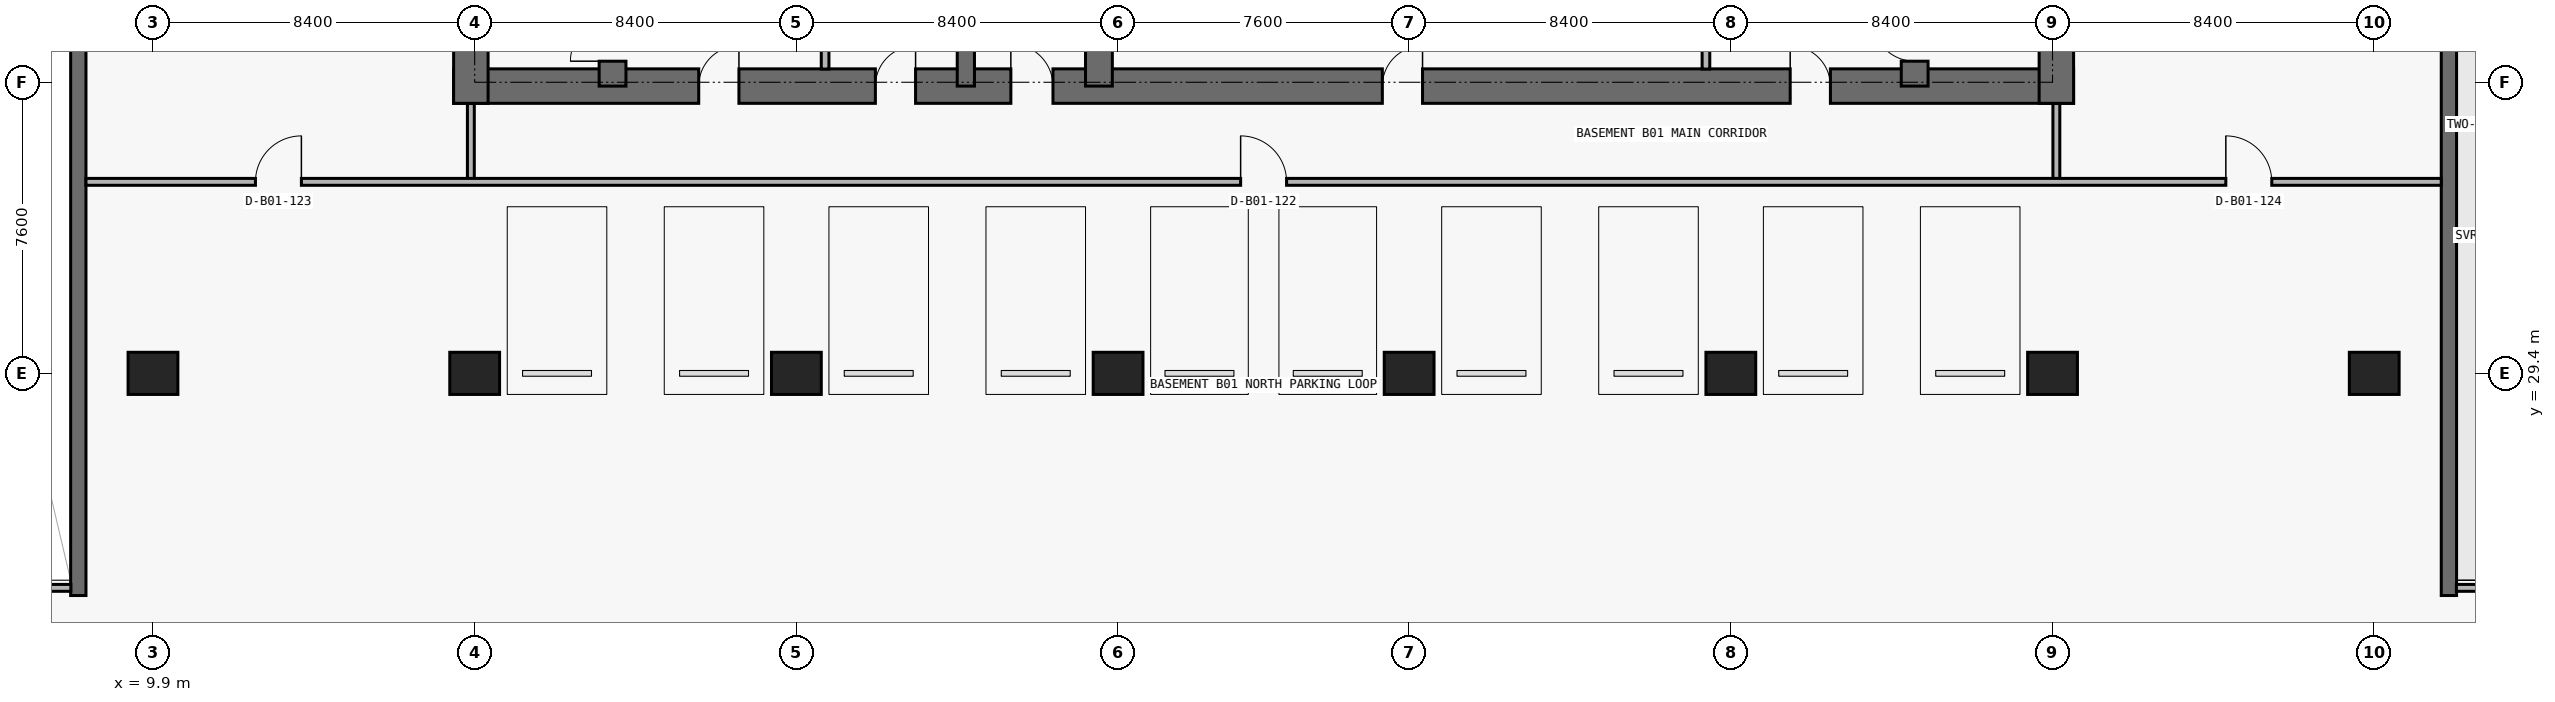
"""IFC4 building model, lengths in metres.
Left out: names, types, materials, properties, quantities, classifications, styles, units other than length and angle.
Written with IfcOpenShell. Run it as: python <this file> out.ifc"""

import sys

from ifc_helpers import new_model, si_unit, direction, frame, frame_2d, origin, origin_2d, place, context, subcontext, project, spatial, rectangle, extrude, element, fill, save


model = new_model("IFC4")
c1 = context("Model", 3, precision=1e-05, world=origin(), true_north=direction((0.0, 1.0)))
c2 = subcontext(c1, "Body", "Model", "MODEL_VIEW")
j1 = project(units=[si_unit("LENGTHUNIT", "METRE"), si_unit("PLANEANGLEUNIT", "RADIAN")], contexts=[c1])
p1 = place(None, origin())
s1 = spatial("IfcSite", under=j1, at=p1, CompositionType="ELEMENT")
p2 = place(p1, origin())
s2 = spatial("IfcBuilding", under=s1, at=p2, CompositionType="ELEMENT")
p3 = place(p2, frame((0.0, 0.0, -4.5)))
s3 = spatial("IfcBuildingStorey", under=s2, at=p3, CompositionType="ELEMENT", Elevation=-4.5)
for number, where, z_axis, x_axis in (
    (1, (7.95, 23.6, 0.0), (0.0, 0.0, 1.0), (0.0, 1.0, 0.0)),
    (2, (69.85, 23.6, 0.0), (0.0, 0.0, 1.0), (0.0, 1.0, 0.0)),
):
    element("IfcWall", number, at=place(p3, frame(where, z_axis=z_axis, x_axis=x_axis)), inside=s3, PredefinedType="SHEAR", context=c2, shape_type="SweptSolid", body=[
        extrude(rectangle(XDim=24.2, YDim=0.4, at=frame_2d((12.1, 0.0))), origin(), (0.0, 0.0, 1.0), 4.2),
    ])
for number, where, z_axis, x_axis in (
    (3, (9.9, 29.4, 0.0), (0.0, 0.0, 1.0), (1.0, 0.0, 0.0)),
    (4, (18.3, 29.4, 0.0), (0.0, 0.0, 1.0), (1.0, 0.0, 0.0)),
    (5, (26.7, 29.4, 0.0), (0.0, 0.0, 1.0), (1.0, 0.0, 0.0)),
    (6, (35.1, 29.4, 0.0), (0.0, 0.0, 1.0), (1.0, 0.0, 0.0)),
    (7, (42.7, 29.4, 0.0), (0.0, 0.0, 1.0), (1.0, 0.0, 0.0)),
    (8, (51.1, 29.4, 0.0), (0.0, 0.0, 1.0), (1.0, 0.0, 0.0)),
    (9, (59.5, 29.4, 0.0), (0.0, 0.0, 1.0), (1.0, 0.0, 0.0)),
    (10, (67.9, 29.4, 0.0), (0.0, 0.0, 1.0), (1.0, 0.0, 0.0)),
):
    element("IfcColumn", number, at=place(p3, frame(where, z_axis=z_axis, x_axis=x_axis)), inside=s3, PredefinedType="COLUMN", context=c2, shape_type="SweptSolid", body=[
        extrude(rectangle(XDim=1.3, YDim=1.1, at=origin_2d()), origin(), (0.0, 0.0, 1.0), 4.2),
    ])
p4 = place(p3, frame((17.75, 36.9, 0.0), z_axis=(0.0, 0.0, 1.0), x_axis=(1.0, 0.0, 0.0)))
e11 = element("IfcWall", 11, at=p4, inside=s3, PredefinedType="SHEAR", context=c2, shape_type="SweptSolid", body=[
    extrude(rectangle(XDim=42.3, YDim=0.9, at=frame_2d((21.15, 0.0))), origin(), (0.0, 0.0, 1.0), 4.2),
])
p5 = place(p4, frame((14.55, 0.0, 0.0)))
e12 = element("IfcOpeningElement", 12, at=p5, cuts=e11, PredefinedType="OPENING", context=c2, shape_type="SweptSolid", body=[
    extrude(rectangle(XDim=1.1, YDim=2.15, at=frame_2d((0.55, 1.075))), frame((0.0, 0.46, 0.0), z_axis=(0.0, -1.0, 0.0), x_axis=(1.0, 0.0, 0.0)), (0.0, 0.0, 1.0), 0.92),
])
p6 = place(p4, frame((6.4, 0.0, 0.0)))
e13 = element("IfcOpeningElement", 13, at=p6, cuts=e11, PredefinedType="OPENING", context=c2, shape_type="SweptSolid", body=[
    extrude(rectangle(XDim=1.05, YDim=2.15, at=frame_2d((0.525, 1.075))), frame((0.0, 0.46, 0.0), z_axis=(0.0, -1.0, 0.0), x_axis=(1.0, 0.0, 0.0)), (0.0, 0.0, 1.0), 0.92),
])
p7 = place(p4, frame((34.9, 0.0, 0.0)))
e14 = element("IfcOpeningElement", 14, at=p7, cuts=e11, PredefinedType="OPENING", context=c2, shape_type="SweptSolid", body=[
    extrude(rectangle(XDim=1.05, YDim=2.15, at=frame_2d((0.525, 1.075))), frame((0.0, 0.46, 0.0), z_axis=(0.0, -1.0, 0.0), x_axis=(1.0, 0.0, 0.0)), (0.0, 0.0, 1.0), 0.92),
])
p8 = place(p4, frame((11.012, 0.0, 0.0)))
e15 = element("IfcOpeningElement", 15, at=p8, cuts=e11, PredefinedType="OPENING", context=c2, shape_type="SweptSolid", body=[
    extrude(rectangle(XDim=1.05, YDim=2.15, at=frame_2d((0.525, 1.075))), frame((0.0, 0.46, 0.0), z_axis=(0.0, -1.0, 0.0), x_axis=(1.0, 0.0, 0.0)), (0.0, 0.0, 1.0), 0.92),
])
p9 = place(p4, frame((24.25, 0.0, 0.0)))
e16 = element("IfcOpeningElement", 16, at=p9, cuts=e11, PredefinedType="OPENING", context=c2, shape_type="SweptSolid", body=[
    extrude(rectangle(XDim=1.05, YDim=2.15, at=frame_2d((0.525, 1.075))), frame((0.0, 0.46, 0.0), z_axis=(0.0, -1.0, 0.0), x_axis=(1.0, 0.0, 0.0)), (0.0, 0.0, 1.0), 0.92),
])
for number, where, z_axis, x_axis in (
    (17, (18.2, 36.45, 0.0), (0.0, 0.0, 1.0), (0.0, 1.0, 0.0)),
    (18, (59.6, 36.45, 0.0), (0.0, 0.0, 1.0), (0.0, 1.0, 0.0)),
):
    element("IfcWall", number, at=place(p3, frame(where, z_axis=z_axis, x_axis=x_axis)), inside=s3, PredefinedType="SHEAR", context=c2, shape_type="SweptSolid", body=[
        extrude(rectangle(XDim=14.15, YDim=0.9, at=frame_2d((7.075, 0.0))), origin(), (0.0, 0.0, 1.0), 4.2),
    ])
p10 = place(p3, frame((21.9, 36.9, 0.0), z_axis=(0.0, 0.0, 1.0), x_axis=(0.0, 1.0, 0.0)))
e19 = element("IfcWall", 19, at=p10, inside=s3, PredefinedType="SHEAR", context=c2, shape_type="SweptSolid", body=[
    extrude(rectangle(XDim=9.675, YDim=0.7, at=frame_2d((4.837, 0.0))), origin(), (0.0, 0.0, 1.0), 4.2),
])
p11 = place(p10, frame((0.65, 0.0, 0.0)))
e20 = element("IfcOpeningElement", 20, at=p11, cuts=e19, PredefinedType="OPENING", context=c2, shape_type="SweptSolid", body=[
    extrude(rectangle(XDim=1.1, YDim=2.15, at=frame_2d((0.55, 1.075))), frame((0.0, 0.36, 0.0), z_axis=(0.0, -1.0, 0.0), x_axis=(1.0, 0.0, 0.0)), (0.0, 0.0, 1.0), 0.72),
])
p12 = place(p3, frame((55.9, 36.9, 0.0), z_axis=(0.0, 0.0, 1.0), x_axis=(0.0, 1.0, 0.0)))
e21 = element("IfcWall", 21, at=p12, inside=s3, PredefinedType="SHEAR", context=c2, shape_type="SweptSolid", body=[
    extrude(rectangle(XDim=9.675, YDim=0.7, at=frame_2d((4.837, 0.0))), origin(), (0.0, 0.0, 1.0), 4.2),
])
p13 = place(p12, frame((0.65, 0.0, 0.0)))
e22 = element("IfcOpeningElement", 22, at=p13, cuts=e21, PredefinedType="OPENING", context=c2, shape_type="SweptSolid", body=[
    extrude(rectangle(XDim=1.1, YDim=2.15, at=frame_2d((0.55, 1.075))), frame((0.0, 0.36, 0.0), z_axis=(0.0, -1.0, 0.0), x_axis=(1.0, 0.0, 0.0)), (0.0, 0.0, 1.0), 0.72),
])
p14 = place(p3, frame((31.125, 36.9, 0.0), z_axis=(0.0, 0.0, 1.0), x_axis=(0.0, 1.0, 0.0)))
e23 = element("IfcWall", 23, at=p14, inside=s3, PredefinedType="SHEAR", context=c2, shape_type="SweptSolid", body=[
    extrude(rectangle(XDim=9.675, YDim=0.45, at=frame_2d((4.837, 0.0))), origin(), (0.0, 0.0, 1.0), 4.2),
])
p15 = place(p3, frame((34.6, 36.9, 0.0), z_axis=(0.0, 0.0, 1.0), x_axis=(0.0, 1.0, 0.0)))
e24 = element("IfcWall", 24, at=p15, inside=s3, PredefinedType="SHEAR", context=c2, shape_type="SweptSolid", body=[
    extrude(rectangle(XDim=9.675, YDim=0.7, at=frame_2d((4.837, 0.0))), origin(), (0.0, 0.0, 1.0), 4.2),
])
p16 = place(p3, frame((18.2, 34.4, 0.0), z_axis=(0.0, 0.0, 1.0), x_axis=(0.0, 1.0, 0.0)))
e25 = element("IfcWall", 25, at=p16, inside=s3, PredefinedType="PARTITIONING", context=c2, shape_type="SweptSolid", body=[
    extrude(rectangle(XDim=2.045, YDim=0.18, at=frame_2d((1.022, 0.0))), origin(), (0.0, 0.0, 1.0), 3.085),
])
for number, where, z_axis, x_axis in (
    (26, (27.45, 37.345, 0.0), (0.0, 0.0, 1.0), (0.0, 1.0, 0.0)),
    (27, (50.45, 37.345, 0.0), (0.0, 0.0, 1.0), (0.0, 1.0, 0.0)),
):
    element("IfcWall", number, at=place(p3, frame(where, z_axis=z_axis, x_axis=x_axis)), inside=s3, PredefinedType="PARTITIONING", context=c2, shape_type="SweptSolid", body=[
        extrude(rectangle(XDim=5.385, YDim=0.2, at=frame_2d((2.692, 0.0))), origin(), (0.0, 0.0, 1.0), 4.2),
    ])
p17 = place(p3, frame((59.6, 34.4, 0.0), z_axis=(0.0, 0.0, 1.0), x_axis=(0.0, 1.0, 0.0)))
e28 = element("IfcWall", 28, at=p17, inside=s3, PredefinedType="PARTITIONING", context=c2, shape_type="SweptSolid", body=[
    extrude(rectangle(XDim=2.045, YDim=0.18, at=frame_2d((1.022, 0.0))), origin(), (0.0, 0.0, 1.0), 3.085),
])
p18 = place(p3, frame((5.155, 23.8, 0.0), z_axis=(0.0, 0.0, 1.0), x_axis=(1.0, 0.0, 0.0)))
e29 = element("IfcWall", 29, at=p18, inside=s3, PredefinedType="PARTITIONING", context=c2, shape_type="SweptSolid", body=[
    extrude(rectangle(XDim=2.6, YDim=0.18, at=frame_2d((1.3, 0.0))), origin(), (0.0, 0.0, 1.0), 4.2),
])
p19 = place(p3, frame((70.045, 23.8, 0.0), z_axis=(0.0, 0.0, 1.0), x_axis=(1.0, 0.0, 0.0)))
e30 = element("IfcWall", 30, at=p19, inside=s3, PredefinedType="PARTITIONING", context=c2, shape_type="SweptSolid", body=[
    extrude(rectangle(XDim=2.6, YDim=0.18, at=frame_2d((1.3, 0.0))), origin(), (0.0, 0.0, 1.0), 4.2),
])
p20 = place(p3, frame((8.15, 34.4, 0.0), z_axis=(0.0, 0.0, 1.0), x_axis=(1.0, 0.0, 0.0)))
e31 = element("IfcWall", 31, at=p20, inside=s3, PredefinedType="PARTITIONING", context=c2, shape_type="SweptSolid", body=[
    extrude(rectangle(XDim=61.5, YDim=0.18, at=frame_2d((30.75, 0.0))), origin(), (0.0, 0.0, 1.0), 4.2),
])
p21 = place(p20, frame((30.15, 0.0, 0.0)))
e32 = element("IfcOpeningElement", 32, at=p21, cuts=e31, PredefinedType="OPENING", context=c2, shape_type="SweptSolid", body=[
    extrude(rectangle(XDim=1.2, YDim=2.2, at=frame_2d((0.6, 1.1))), frame((0.0, 0.1, 0.0), z_axis=(0.0, -1.0, 0.0), x_axis=(1.0, 0.0, 0.0)), (0.0, 0.0, 1.0), 0.2),
])
p22 = place(p20, frame((4.425, 0.0, 0.0)))
e33 = element("IfcOpeningElement", 33, at=p22, cuts=e31, PredefinedType="OPENING", context=c2, shape_type="SweptSolid", body=[
    extrude(rectangle(XDim=1.2, YDim=2.2, at=frame_2d((0.6, 1.1))), frame((0.0, 0.1, 0.0), z_axis=(0.0, -1.0, 0.0), x_axis=(1.0, 0.0, 0.0)), (0.0, 0.0, 1.0), 0.2),
])
p23 = place(p20, frame((55.875, 0.0, 0.0)))
e34 = element("IfcOpeningElement", 34, at=p23, cuts=e31, PredefinedType="OPENING", context=c2, shape_type="SweptSolid", body=[
    extrude(rectangle(XDim=1.2, YDim=2.2, at=frame_2d((0.6, 1.1))), frame((0.0, 0.1, 0.0), z_axis=(0.0, -1.0, 0.0), x_axis=(1.0, 0.0, 0.0)), (0.0, 0.0, 1.0), 0.2),
])
p24 = place(p5, origin())
e35 = element("IfcDoor", 35, at=p24, inside=s3, OperationType="SINGLE_SWING_LEFT", PredefinedType="DOOR", context=c2, shape_type="SweptSolid", body=[
    extrude(rectangle(XDim=1.1, YDim=2.15, at=frame_2d((0.55, 1.075))), frame((0.0, 0.025, 0.0), z_axis=(0.0, -1.0, 0.0), x_axis=(1.0, 0.0, 0.0)), (0.0, 0.0, 1.0), 0.05),
])
fill(e12, e35)
p25 = place(p6, origin())
e36 = element("IfcDoor", 36, at=p25, inside=s3, OperationType="SINGLE_SWING_RIGHT", PredefinedType="DOOR", context=c2, shape_type="SweptSolid", body=[
    extrude(rectangle(XDim=1.05, YDim=2.15, at=frame_2d((0.525, 1.075))), frame((0.0, 0.025, 0.0), z_axis=(0.0, -1.0, 0.0), x_axis=(1.0, 0.0, 0.0)), (0.0, 0.0, 1.0), 0.05),
])
fill(e13, e36)
p26 = place(p11, origin())
e37 = element("IfcDoor", 37, at=p26, inside=s3, OperationType="SINGLE_SWING_LEFT", PredefinedType="DOOR", context=c2, shape_type="SweptSolid", body=[
    extrude(rectangle(XDim=1.1, YDim=2.15, at=frame_2d((0.55, 1.075))), frame((0.0, 0.025, 0.0), z_axis=(0.0, -1.0, 0.0), x_axis=(1.0, 0.0, 0.0)), (0.0, 0.0, 1.0), 0.05),
])
fill(e20, e37)
p27 = place(p7, origin())
e38 = element("IfcDoor", 38, at=p27, inside=s3, OperationType="SINGLE_SWING_LEFT", PredefinedType="DOOR", context=c2, shape_type="SweptSolid", body=[
    extrude(rectangle(XDim=1.05, YDim=2.15, at=frame_2d((0.525, 1.075))), frame((0.0, 0.025, 0.0), z_axis=(0.0, -1.0, 0.0), x_axis=(1.0, 0.0, 0.0)), (0.0, 0.0, 1.0), 0.05),
])
fill(e14, e38)
p28 = place(p13, origin())
e39 = element("IfcDoor", 39, at=p28, inside=s3, OperationType="SINGLE_SWING_RIGHT", PredefinedType="DOOR", context=c2, shape_type="SweptSolid", body=[
    extrude(rectangle(XDim=1.1, YDim=2.15, at=frame_2d((0.55, 1.075))), frame((0.0, 0.025, 0.0), z_axis=(0.0, -1.0, 0.0), x_axis=(1.0, 0.0, 0.0)), (0.0, 0.0, 1.0), 0.05),
])
fill(e22, e39)
p29 = place(p8, origin())
e40 = element("IfcDoor", 40, at=p29, inside=s3, OperationType="SINGLE_SWING_RIGHT", PredefinedType="DOOR", context=c2, shape_type="SweptSolid", body=[
    extrude(rectangle(XDim=1.05, YDim=2.15, at=frame_2d((0.525, 1.075))), frame((0.0, 0.025, 0.0), z_axis=(0.0, -1.0, 0.0), x_axis=(1.0, 0.0, 0.0)), (0.0, 0.0, 1.0), 0.05),
])
fill(e15, e40)
p30 = place(p9, origin())
e41 = element("IfcDoor", 41, at=p30, inside=s3, OperationType="SINGLE_SWING_RIGHT", PredefinedType="DOOR", context=c2, shape_type="SweptSolid", body=[
    extrude(rectangle(XDim=1.05, YDim=2.15, at=frame_2d((0.525, 1.075))), frame((0.0, 0.025, 0.0), z_axis=(0.0, -1.0, 0.0), x_axis=(1.0, 0.0, 0.0)), (0.0, 0.0, 1.0), 0.05),
])
fill(e16, e41)
p31 = place(p21, origin())
e42 = element("IfcDoor", 42, at=p31, inside=s3, OperationType="SINGLE_SWING_LEFT", PredefinedType="DOOR", context=c2, shape_type="SweptSolid", body=[
    extrude(rectangle(XDim=1.2, YDim=2.2, at=frame_2d((0.6, 1.1))), frame((0.0, 0.025, 0.0), z_axis=(0.0, -1.0, 0.0), x_axis=(1.0, 0.0, 0.0)), (0.0, 0.0, 1.0), 0.05),
])
fill(e32, e42)
p32 = place(p22, origin())
e43 = element("IfcDoor", 43, at=p32, inside=s3, OperationType="SINGLE_SWING_RIGHT", PredefinedType="DOOR", context=c2, shape_type="SweptSolid", body=[
    extrude(rectangle(XDim=1.2, YDim=2.2, at=frame_2d((0.6, 1.1))), frame((0.0, 0.025, 0.0), z_axis=(0.0, -1.0, 0.0), x_axis=(1.0, 0.0, 0.0)), (0.0, 0.0, 1.0), 0.05),
])
fill(e33, e43)
p33 = place(p23, origin())
e44 = element("IfcDoor", 44, at=p33, inside=s3, OperationType="SINGLE_SWING_LEFT", PredefinedType="DOOR", context=c2, shape_type="SweptSolid", body=[
    extrude(rectangle(XDim=1.2, YDim=2.2, at=frame_2d((0.6, 1.1))), frame((0.0, 0.025, 0.0), z_axis=(0.0, -1.0, 0.0), x_axis=(1.0, 0.0, 0.0)), (0.0, 0.0, 1.0), 0.05),
])
fill(e34, e44)
save(model, sys.argv[1])
